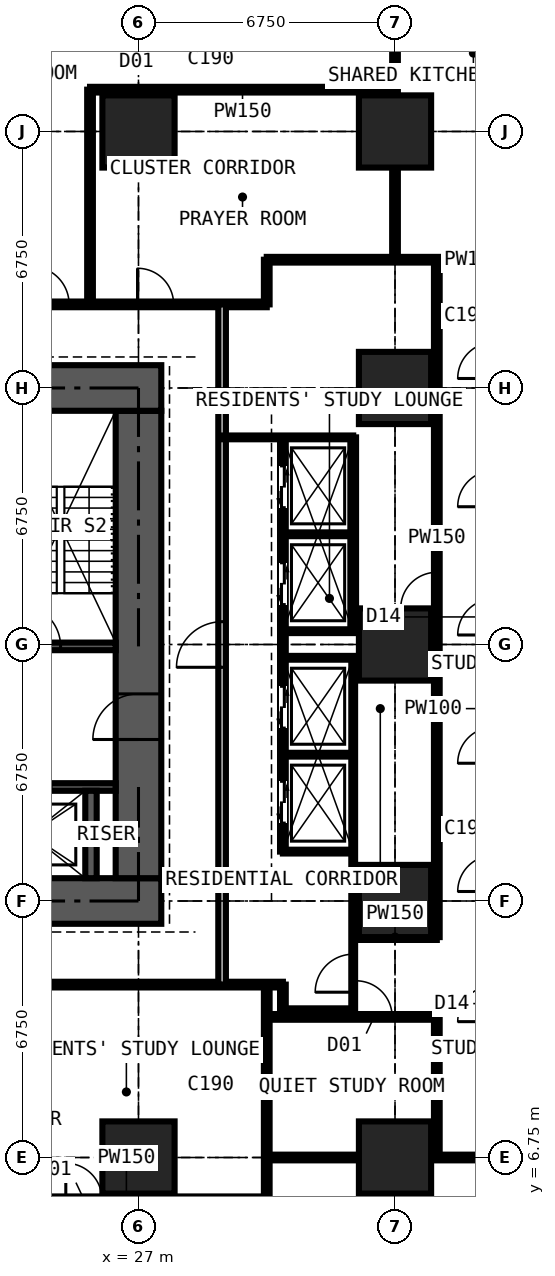
"""IFC4 building model, lengths in metres.
Left out: names, types, materials, properties, quantities, classifications, styles, units other than length and angle.
Written with IfcOpenShell. Run it as: python <this file> out.ifc"""

import sys

from ifc_helpers import new_model, si_unit, direction, frame, frame_2d, origin, origin_2d, place, context, subcontext, project, spatial, rectangle, extrude, element, fill, save


model = new_model("IFC4")
c1 = context("Model", 3, precision=1e-05, world=origin(), true_north=direction((0.0, 1.0)))
c2 = subcontext(c1, "Body", "Model", "MODEL_VIEW")
j1 = project(units=[si_unit("LENGTHUNIT", "METRE"), si_unit("PLANEANGLEUNIT", "RADIAN")], contexts=[c1])
p1 = place(None, origin())
s1 = spatial("IfcSite", under=j1, at=p1, CompositionType="ELEMENT")
p2 = place(p1, origin())
s2 = spatial("IfcBuilding", under=s1, at=p2, CompositionType="ELEMENT")
p3 = place(p2, frame((0.0, 0.0, 25.2)))
s3 = spatial("IfcBuildingStorey", under=s2, at=p3, CompositionType="ELEMENT", Elevation=25.2)
for number, where, z_axis, x_axis in (
    (1, (27.0, 6.75, 0.0), (0.0, 0.0, 1.0), (1.0, 0.0, 0.0)),
    (2, (27.0, 33.75, 0.0), (0.0, 0.0, 1.0), (1.0, 0.0, 0.0)),
    (3, (33.75, 6.75, 0.0), (0.0, 0.0, 1.0), (1.0, 0.0, 0.0)),
    (4, (33.75, 13.5, 0.0), (0.0, 0.0, 1.0), (1.0, 0.0, 0.0)),
    (5, (33.75, 20.25, 0.0), (0.0, 0.0, 1.0), (1.0, 0.0, 0.0)),
    (6, (33.75, 27.0, 0.0), (0.0, 0.0, 1.0), (1.0, 0.0, 0.0)),
    (7, (33.75, 33.75, 0.0), (0.0, 0.0, 1.0), (1.0, 0.0, 0.0)),
):
    element("IfcColumn", number, at=place(p3, frame(where, z_axis=z_axis, x_axis=x_axis)), inside=s3, PredefinedType="COLUMN", context=c2, shape_type="SweptSolid", body=[
        extrude(rectangle(XDim=1.9, YDim=1.9, at=origin_2d()), origin(), (0.0, 0.0, 1.0), 3.6),
    ])
p4 = place(p3, frame((12.9, 13.5, 0.0), z_axis=(0.0, 0.0, 1.0), x_axis=(1.0, 0.0, 0.0)))
e8 = element("IfcWall", 8, at=p4, inside=s3, PredefinedType="SHEAR", context=c2, shape_type="SweptSolid", body=[
    extrude(rectangle(XDim=14.7, YDim=1.2, at=frame_2d((7.35, 0.0))), origin(), (0.0, 0.0, 1.0), 3.6),
])
p5 = place(p3, frame((27.0, 14.1, 0.0), z_axis=(0.0, 0.0, 1.0), x_axis=(0.0, 1.0, 0.0)))
e9 = element("IfcWall", 9, at=p5, inside=s3, PredefinedType="SHEAR", context=c2, shape_type="SweptSolid", body=[
    extrude(rectangle(XDim=12.3, YDim=1.2, at=frame_2d((6.15, 0.0))), origin(), (0.0, 0.0, 1.0), 3.6),
])
p6 = place(p5, frame((3.65, 0.0, 0.0)))
e10 = element("IfcOpeningElement", 10, at=p6, cuts=e9, PredefinedType="OPENING", context=c2, shape_type="SweptSolid", body=[
    extrude(rectangle(XDim=1.2, YDim=2.2, at=frame_2d((0.6, 1.1))), frame((0.0, 0.61, 0.0), z_axis=(0.0, -1.0, 0.0), x_axis=(1.0, 0.0, 0.0)), (0.0, 0.0, 1.0), 1.22),
])
p7 = place(p3, frame((27.6, 27.0, 0.0), z_axis=(0.0, 0.0, 1.0), x_axis=(-1.0, 0.0, 0.0)))
e11 = element("IfcWall", 11, at=p7, inside=s3, PredefinedType="SHEAR", context=c2, shape_type="SweptSolid", body=[
    extrude(rectangle(XDim=14.7, YDim=1.2, at=frame_2d((7.35, 0.0))), origin(), (0.0, 0.0, 1.0), 3.6),
])
p8 = place(p7, frame((5.225, 0.0, 0.0)))
e12 = element("IfcOpeningElement", 12, at=p8, cuts=e11, PredefinedType="OPENING", context=c2, shape_type="SweptSolid", body=[
    extrude(rectangle(XDim=0.9, YDim=2.2, at=frame_2d((0.45, 1.1))), frame((0.0, 0.61, 0.0), z_axis=(0.0, -1.0, 0.0), x_axis=(1.0, 0.0, 0.0)), (0.0, 0.0, 1.0), 1.22),
])
p9 = place(p7, frame((8.2, 0.0, 0.0)))
e13 = element("IfcOpeningElement", 13, at=p9, cuts=e11, PredefinedType="OPENING", context=c2, shape_type="SweptSolid", body=[
    extrude(rectangle(XDim=1.0, YDim=2.2, at=frame_2d((0.5, 1.1))), frame((0.0, 0.61, 0.0), z_axis=(0.0, -1.0, 0.0), x_axis=(1.0, 0.0, 0.0)), (0.0, 0.0, 1.0), 1.22),
])
p10 = place(p3, frame((14.1, 16.5, 0.0), z_axis=(0.0, 0.0, 1.0), x_axis=(1.0, 0.0, 0.0)))
e14 = element("IfcWall", 14, at=p10, inside=s3, PredefinedType="SHEAR", context=c2, shape_type="SweptSolid", body=[
    extrude(rectangle(XDim=12.3, YDim=0.2, at=frame_2d((6.15, 0.0))), origin(), (0.0, 0.0, 1.0), 3.6),
])
p11 = place(p10, frame((0.9, 0.0, 0.0)))
e15 = element("IfcOpeningElement", 15, at=p11, cuts=e14, PredefinedType="OPENING", context=c2, shape_type="SweptSolid", body=[
    extrude(rectangle(XDim=1.1, YDim=2.2, at=frame_2d((0.55, 1.1))), frame((0.0, 0.11, 0.0), z_axis=(0.0, -1.0, 0.0), x_axis=(1.0, 0.0, 0.0)), (0.0, 0.0, 1.0), 0.22),
])
p12 = place(p10, frame((9.5, 0.0, 0.0)))
e16 = element("IfcOpeningElement", 16, at=p12, cuts=e14, PredefinedType="OPENING", context=c2, shape_type="SweptSolid", body=[
    extrude(rectangle(XDim=1.1, YDim=2.2, at=frame_2d((0.55, 1.1))), frame((0.0, 0.11, 0.0), z_axis=(0.0, -1.0, 0.0), x_axis=(1.0, 0.0, 0.0)), (0.0, 0.0, 1.0), 0.22),
])
p13 = place(p3, frame((14.1, 20.2, 0.0), z_axis=(0.0, 0.0, 1.0), x_axis=(1.0, 0.0, 0.0)))
e17 = element("IfcWall", 17, at=p13, inside=s3, PredefinedType="SHEAR", context=c2, shape_type="SweptSolid", body=[
    extrude(rectangle(XDim=12.3, YDim=0.2, at=frame_2d((6.15, 0.0))), origin(), (0.0, 0.0, 1.0), 3.6),
])
p14 = place(p13, frame((0.35, 0.0, 0.0)))
e18 = element("IfcOpeningElement", 18, at=p14, cuts=e17, PredefinedType="OPENING", context=c2, shape_type="SweptSolid", body=[
    extrude(rectangle(XDim=1.1, YDim=2.2, at=frame_2d((0.55, 1.1))), frame((0.0, 0.11, 0.0), z_axis=(0.0, -1.0, 0.0), x_axis=(1.0, 0.0, 0.0)), (0.0, 0.0, 1.0), 0.22),
])
p15 = place(p13, frame((9.75, 0.0, 0.0)))
e19 = element("IfcOpeningElement", 19, at=p15, cuts=e17, PredefinedType="OPENING", context=c2, shape_type="SweptSolid", body=[
    extrude(rectangle(XDim=1.1, YDim=2.2, at=frame_2d((0.55, 1.1))), frame((0.0, 0.11, 0.0), z_axis=(0.0, -1.0, 0.0), x_axis=(1.0, 0.0, 0.0)), (0.0, 0.0, 1.0), 0.22),
])
p16 = place(p3, frame((25.75, 14.1, 0.0), z_axis=(0.0, 0.0, 1.0), x_axis=(0.0, 1.0, 0.0)))
e20 = element("IfcWall", 20, at=p16, inside=s3, PredefinedType="SHEAR", context=c2, shape_type="SweptSolid", body=[
    extrude(rectangle(XDim=2.3, YDim=0.3, at=frame_2d((1.15, 0.0))), origin(), (0.0, 0.0, 1.0), 3.6),
])
p17 = place(p3, frame((10.125, 11.3, 0.0), z_axis=(0.0, 0.0, 1.0), x_axis=(1.0, 0.0, 0.0)))
e21 = element("IfcWall", 21, at=p17, inside=s3, PredefinedType="PARTITIONING", context=c2, shape_type="SweptSolid", body=[
    extrude(rectangle(XDim=20.675, YDim=0.15, at=frame_2d((10.337, 0.0))), origin(), (0.0, 0.0, 1.0), 3.375),
])
p18 = place(p17, frame((1.775, 0.0, 0.0)))
e22 = element("IfcOpeningElement", 22, at=p18, cuts=e21, PredefinedType="OPENING", context=c2, shape_type="SweptSolid", body=[
    extrude(rectangle(XDim=1.0, YDim=2.2, at=frame_2d((0.5, 1.1))), frame((0.0, 0.085, 0.0), z_axis=(0.0, -1.0, 0.0), x_axis=(1.0, 0.0, 0.0)), (0.0, 0.0, 1.0), 0.17),
])
p19 = place(p17, frame((11.312, 0.0, 0.0)))
e23 = element("IfcOpeningElement", 23, at=p19, cuts=e21, PredefinedType="OPENING", context=c2, shape_type="SweptSolid", body=[
    extrude(rectangle(XDim=1.0, YDim=2.2, at=frame_2d((0.5, 1.1))), frame((0.0, 0.085, 0.0), z_axis=(0.0, -1.0, 0.0), x_axis=(1.0, 0.0, 0.0)), (0.0, 0.0, 1.0), 0.17),
])
p20 = place(p3, frame((11.3, 29.2, 0.0), z_axis=(0.0, 0.0, 1.0), x_axis=(1.0, 0.0, 0.0)))
e24 = element("IfcWall", 24, at=p20, inside=s3, PredefinedType="PARTITIONING", context=c2, shape_type="SweptSolid", body=[
    extrude(rectangle(XDim=19.075, YDim=0.15, at=frame_2d((9.538, 0.0))), origin(), (0.0, 0.0, 1.0), 3.375),
])
p21 = place(p20, frame((12.875, 0.0, 0.0)))
e25 = element("IfcOpeningElement", 25, at=p21, cuts=e24, PredefinedType="OPENING", context=c2, shape_type="SweptSolid", body=[
    extrude(rectangle(XDim=1.0, YDim=2.2, at=frame_2d((0.5, 1.1))), frame((0.0, 0.085, 0.0), z_axis=(0.0, -1.0, 0.0), x_axis=(1.0, 0.0, 0.0)), (0.0, 0.0, 1.0), 0.17),
])
p22 = place(p20, frame((10.438, 0.0, 0.0)))
e26 = element("IfcOpeningElement", 26, at=p22, cuts=e24, PredefinedType="OPENING", context=c2, shape_type="SweptSolid", body=[
    extrude(rectangle(XDim=1.0, YDim=2.2, at=frame_2d((0.5, 1.1))), frame((0.0, 0.085, 0.0), z_axis=(0.0, -1.0, 0.0), x_axis=(1.0, 0.0, 0.0)), (0.0, 0.0, 1.0), 0.17),
])
p23 = place(p20, frame((15.675, 0.0, 0.0)))
e27 = element("IfcOpeningElement", 27, at=p23, cuts=e24, PredefinedType="OPENING", context=c2, shape_type="SweptSolid", body=[
    extrude(rectangle(XDim=0.95, YDim=2.2, at=frame_2d((0.475, 1.1))), frame((0.0, 0.085, 0.0), z_axis=(0.0, -1.0, 0.0), x_axis=(1.0, 0.0, 0.0)), (0.0, 0.0, 1.0), 0.17),
])
p24 = place(p3, frame((25.725, 29.2, 0.0), z_axis=(0.0, 0.0, 1.0), x_axis=(0.0, 1.0, 0.0)))
e28 = element("IfcWall", 28, at=p24, inside=s3, PredefinedType="PARTITIONING", context=c2, shape_type="SweptSolid", body=[
    extrude(rectangle(XDim=5.65, YDim=0.15, at=frame_2d((2.825, 0.0))), origin(), (0.0, 0.0, 1.0), 3.375),
])
p25 = place(p3, frame((25.725, 34.85, 0.0), z_axis=(0.0, 0.0, 1.0), x_axis=(1.0, 0.0, 0.0)))
e29 = element("IfcWall", 29, at=p25, inside=s3, PredefinedType="PARTITIONING", context=c2, shape_type="SweptSolid", body=[
    extrude(rectangle(XDim=8.025, YDim=0.15, at=frame_2d((4.012, 0.0))), origin(), (0.0, 0.0, 1.0), 3.375),
])
p26 = place(p3, frame((29.2, 11.3, 0.0), z_axis=(0.0, 0.0, 1.0), x_axis=(0.0, 1.0, 0.0)))
e30 = element("IfcWall", 30, at=p26, inside=s3, PredefinedType="PARTITIONING", context=c2, shape_type="SweptSolid", body=[
    extrude(rectangle(XDim=17.9, YDim=0.2, at=frame_2d((8.95, 0.0))), origin(), (0.0, 0.0, 1.0), 3.375),
])
p27 = place(p26, frame((8.35, 0.0, 0.0)))
e31 = element("IfcOpeningElement", 31, at=p27, cuts=e30, PredefinedType="OPENING", context=c2, shape_type="SweptSolid", body=[
    extrude(rectangle(XDim=1.2, YDim=2.2, at=frame_2d((0.6, 1.1))), frame((0.0, 0.11, 0.0), z_axis=(0.0, -1.0, 0.0), x_axis=(1.0, 0.0, 0.0)), (0.0, 0.0, 1.0), 0.22),
])
p28 = place(p3, frame((29.2, 25.7, 0.0), z_axis=(0.0, 0.0, 1.0), x_axis=(1.0, 0.0, 0.0)))
e32 = element("IfcWall", 32, at=p28, inside=s3, PredefinedType="SHEAR", context=c2, shape_type="SweptSolid", body=[
    extrude(rectangle(XDim=3.45, YDim=0.1, at=frame_2d((1.725, 0.0))), origin(), (0.0, 0.0, 1.0), 3.375),
])
p29 = place(p3, frame((30.375, -0.734, 0.0), z_axis=(0.0, 0.0, 1.0), x_axis=(0.0, 1.0, 0.0)))
e33 = element("IfcWall", 33, at=p29, inside=s3, PredefinedType="PARTITIONING", context=c2, shape_type="SweptSolid", body=[
    extrude(rectangle(XDim=12.034, YDim=0.15, at=frame_2d((6.017, 0.0))), origin(), (0.0, 0.0, 1.0), 3.375),
])
p30 = place(p29, frame((5.134, 0.0, 0.0)))
e34 = element("IfcOpeningElement", 34, at=p30, cuts=e33, PredefinedType="OPENING", context=c2, shape_type="SweptSolid", body=[
    extrude(rectangle(XDim=1.0, YDim=2.2, at=frame_2d((0.5, 1.1))), frame((0.0, 0.085, 0.0), z_axis=(0.0, -1.0, 0.0), x_axis=(1.0, 0.0, 0.0)), (0.0, 0.0, 1.0), 0.17),
])
p31 = place(p3, frame((30.375, 6.75, 0.0), z_axis=(0.0, 0.0, 1.0), x_axis=(1.0, 0.0, 0.0)))
e35 = element("IfcWall", 35, at=p31, inside=s3, PredefinedType="PARTITIONING", context=c2, shape_type="SweptSolid", body=[
    extrude(rectangle(XDim=5.975, YDim=0.15, at=frame_2d((2.988, 0.0))), origin(), (0.0, 0.0, 1.0), 2.877),
])
p32 = place(p3, frame((30.375, 10.45, 0.0), z_axis=(0.0, 0.0, 1.0), x_axis=(1.0, 0.0, 0.0)))
e36 = element("IfcWall", 36, at=p32, inside=s3, PredefinedType="PARTITIONING", context=c2, shape_type="SweptSolid", body=[
    extrude(rectangle(XDim=4.475, YDim=0.15, at=frame_2d((2.238, 0.0))), origin(), (0.0, 0.0, 1.0), 3.375),
])
p33 = place(p32, frame((2.35, 0.0, 0.0)))
e37 = element("IfcOpeningElement", 37, at=p33, cuts=e36, PredefinedType="OPENING", context=c2, shape_type="SweptSolid", body=[
    extrude(rectangle(XDim=0.95, YDim=2.2, at=frame_2d((0.475, 1.1))), frame((0.0, 0.085, 0.0), z_axis=(0.0, -1.0, 0.0), x_axis=(1.0, 0.0, 0.0)), (0.0, 0.0, 1.0), 0.17),
])
p34 = place(p3, frame((30.375, 29.2, 0.0), z_axis=(0.0, 0.0, 1.0), x_axis=(0.0, 1.0, 0.0)))
e38 = element("IfcWall", 38, at=p34, inside=s3, PredefinedType="PARTITIONING", context=c2, shape_type="SweptSolid", body=[
    extrude(rectangle(XDim=1.175, YDim=0.15, at=frame_2d((0.587, 0.0))), origin(), (0.0, 0.0, 1.0), 3.375),
])
p35 = place(p3, frame((30.375, 30.375, 0.0), z_axis=(0.0, 0.0, 1.0), x_axis=(1.0, 0.0, 0.0)))
e39 = element("IfcWall", 39, at=p35, inside=s3, PredefinedType="PARTITIONING", context=c2, shape_type="SweptSolid", body=[
    extrude(rectangle(XDim=10.859, YDim=0.15, at=frame_2d((5.429, 0.0))), origin(), (0.0, 0.0, 1.0), 3.375),
])
p36 = place(p3, frame((30.8, 10.6, 0.0), z_axis=(0.0, 0.0, 1.0), x_axis=(0.0, 1.0, 0.0)))
e40 = element("IfcWall", 40, at=p36, inside=s3, PredefinedType="PARTITIONING", context=c2, shape_type="SweptSolid", body=[
    extrude(rectangle(XDim=0.7, YDim=0.15, at=frame_2d((0.35, 0.0))), origin(), (0.0, 0.0, 1.0), 3.375),
])
p37 = place(p3, frame((30.8, 10.6, 0.0), z_axis=(0.0, 0.0, 1.0), x_axis=(1.0, 0.0, 0.0)))
e41 = element("IfcWall", 41, at=p37, inside=s3, PredefinedType="PARTITIONING", context=c2, shape_type="SweptSolid", body=[
    extrude(rectangle(XDim=1.85, YDim=0.15, at=frame_2d((0.925, 0.0))), origin(), (0.0, 0.0, 1.0), 3.375),
])
p38 = place(p3, frame((30.8, 14.8, 0.0), z_axis=(0.0, 0.0, 1.0), x_axis=(0.0, 1.0, 0.0)))
e42 = element("IfcWall", 42, at=p38, inside=s3, PredefinedType="PARTITIONING", context=c2, shape_type="SweptSolid", body=[
    extrude(rectangle(XDim=10.9, YDim=0.15, at=frame_2d((5.45, 0.0))), origin(), (0.0, 0.0, 1.0), 3.375),
])
p39 = place(p38, frame((0.75, 0.0, 0.0)))
e43 = element("IfcOpeningElement", 43, at=p39, cuts=e42, PredefinedType="OPENING", context=c2, shape_type="SweptSolid", body=[
    extrude(rectangle(XDim=1.1, YDim=2.2, at=frame_2d((0.55, 1.1))), frame((0.0, 0.085, 0.0), z_axis=(0.0, -1.0, 0.0), x_axis=(1.0, 0.0, 0.0)), (0.0, 0.0, 1.0), 0.17),
])
p40 = place(p38, frame((3.25, 0.0, 0.0)))
e44 = element("IfcOpeningElement", 44, at=p40, cuts=e42, PredefinedType="OPENING", context=c2, shape_type="SweptSolid", body=[
    extrude(rectangle(XDim=1.1, YDim=2.2, at=frame_2d((0.55, 1.1))), frame((0.0, 0.085, 0.0), z_axis=(0.0, -1.0, 0.0), x_axis=(1.0, 0.0, 0.0)), (0.0, 0.0, 1.0), 0.17),
])
p41 = place(p38, frame((6.5, 0.0, 0.0)))
e45 = element("IfcOpeningElement", 45, at=p41, cuts=e42, PredefinedType="OPENING", context=c2, shape_type="SweptSolid", body=[
    extrude(rectangle(XDim=1.1, YDim=2.2, at=frame_2d((0.55, 1.1))), frame((0.0, 0.085, 0.0), z_axis=(0.0, -1.0, 0.0), x_axis=(1.0, 0.0, 0.0)), (0.0, 0.0, 1.0), 0.17),
])
p42 = place(p38, frame((9.05, 0.0, 0.0)))
e46 = element("IfcOpeningElement", 46, at=p42, cuts=e42, PredefinedType="OPENING", context=c2, shape_type="SweptSolid", body=[
    extrude(rectangle(XDim=1.1, YDim=2.2, at=frame_2d((0.55, 1.1))), frame((0.0, 0.085, 0.0), z_axis=(0.0, -1.0, 0.0), x_axis=(1.0, 0.0, 0.0)), (0.0, 0.0, 1.0), 0.17),
])
for number, where, z_axis, x_axis in (
    (47, (30.8, 14.8, 0.0), (0.0, 0.0, 1.0), (1.0, 0.0, 0.0)),
    (48, (30.8, 17.35, 0.0), (0.0, 0.0, 1.0), (1.0, 0.0, 0.0)),
    (49, (30.8, 19.9, 0.0), (0.0, 0.0, 1.0), (1.0, 0.0, 0.0)),
    (50, (30.8, 20.6, 0.0), (0.0, 0.0, 1.0), (1.0, 0.0, 0.0)),
    (51, (30.8, 23.15, 0.0), (0.0, 0.0, 1.0), (1.0, 0.0, 0.0)),
):
    element("IfcWall", number, at=place(p3, frame(where, z_axis=z_axis, x_axis=x_axis)), inside=s3, PredefinedType="SHEAR", context=c2, shape_type="SweptSolid", body=[
        extrude(rectangle(XDim=1.85, YDim=0.1, at=frame_2d((0.925, 0.0))), origin(), (0.0, 0.0, 1.0), 3.375),
    ])
p43 = place(p3, frame((32.65, 10.6, 0.0), z_axis=(0.0, 0.0, 1.0), x_axis=(0.0, 1.0, 0.0)))
e52 = element("IfcWall", 52, at=p43, inside=s3, PredefinedType="SHEAR", context=c2, shape_type="SweptSolid", body=[
    extrude(rectangle(XDim=9.3, YDim=0.1, at=frame_2d((4.65, 0.0))), origin(), (0.0, 0.0, 1.0), 3.375),
])
p44 = place(p43, frame((0.5, 0.0, 0.0)))
e53 = element("IfcOpeningElement", 53, at=p44, cuts=e52, PredefinedType="OPENING", context=c2, shape_type="SweptSolid", body=[
    extrude(rectangle(XDim=1.0, YDim=2.2, at=frame_2d((0.5, 1.1))), frame((0.0, 0.06, 0.0), z_axis=(0.0, -1.0, 0.0), x_axis=(1.0, 0.0, 0.0)), (0.0, 0.0, 1.0), 0.12),
])
p45 = place(p3, frame((32.65, 12.55, 0.0), z_axis=(0.0, 0.0, 1.0), x_axis=(1.0, 0.0, 0.0)))
e54 = element("IfcWall", 54, at=p45, inside=s3, PredefinedType="PARTITIONING", context=c2, shape_type="SweptSolid", body=[
    extrude(rectangle(XDim=2.2, YDim=0.15, at=frame_2d((1.1, 0.0))), origin(), (0.0, 0.0, 1.0), 3.375),
])
p46 = place(p3, frame((32.65, 20.6, 0.0), z_axis=(0.0, 0.0, 1.0), x_axis=(0.0, 1.0, 0.0)))
e55 = element("IfcWall", 55, at=p46, inside=s3, PredefinedType="PARTITIONING", context=c2, shape_type="SweptSolid", body=[
    extrude(rectangle(XDim=5.1, YDim=0.15, at=frame_2d((2.55, 0.0))), origin(), (0.0, 0.0, 1.0), 3.375),
])
p47 = place(p3, frame((33.75, 30.375, 0.0), z_axis=(0.0, 0.0, 1.0), x_axis=(0.0, 1.0, 0.0)))
e56 = element("IfcWall", 56, at=p47, inside=s3, PredefinedType="PARTITIONING", context=c2, shape_type="SweptSolid", body=[
    extrude(rectangle(XDim=5.975, YDim=0.15, at=frame_2d((2.988, 0.0))), origin(), (0.0, 0.0, 1.0), 2.877),
])
p48 = place(p3, frame((34.85, 6.75, 0.0), z_axis=(0.0, 0.0, 1.0), x_axis=(0.0, 1.0, 0.0)))
e57 = element("IfcWall", 57, at=p48, inside=s3, PredefinedType="PARTITIONING", context=c2, shape_type="SweptSolid", body=[
    extrude(rectangle(XDim=3.7, YDim=0.15, at=frame_2d((1.85, 0.0))), origin(), (0.0, 0.0, 1.0), 3.375),
])
p49 = place(p3, frame((34.85, 12.55, 0.0), z_axis=(0.0, 0.0, 1.0), x_axis=(0.0, 1.0, 0.0)))
e58 = element("IfcWall", 58, at=p49, inside=s3, PredefinedType="PARTITIONING", context=c2, shape_type="SweptSolid", body=[
    extrude(rectangle(XDim=17.825, YDim=0.15, at=frame_2d((8.913, 0.0))), origin(), (0.0, 0.0, 1.0), 3.375),
])
p50 = place(p49, frame((8.65, 0.0, 0.0)))
e59 = element("IfcOpeningElement", 59, at=p50, cuts=e58, PredefinedType="OPENING", context=c2, shape_type="SweptSolid", body=[
    extrude(rectangle(XDim=0.95, YDim=2.2, at=frame_2d((0.475, 1.1))), frame((0.0, 0.085, 0.0), z_axis=(0.0, -1.0, 0.0), x_axis=(1.0, 0.0, 0.0)), (0.0, 0.0, 1.0), 0.17),
])
p51 = place(p6, origin())
e60 = element("IfcDoor", 60, at=p51, inside=s3, OperationType="DOUBLE_DOOR_SINGLE_SWING", PredefinedType="DOOR", context=c2, shape_type="SweptSolid", body=[
    extrude(rectangle(XDim=1.2, YDim=2.2, at=frame_2d((0.6, 1.1))), frame((0.0, 0.025, 0.0), z_axis=(0.0, -1.0, 0.0), x_axis=(1.0, 0.0, 0.0)), (0.0, 0.0, 1.0), 0.05),
])
fill(e10, e60)
p52 = place(p15, origin())
e61 = element("IfcDoor", 61, at=p52, inside=s3, OperationType="SINGLE_SWING_LEFT", PredefinedType="DOOR", context=c2, shape_type="SweptSolid", body=[
    extrude(rectangle(XDim=1.1, YDim=2.2, at=frame_2d((0.55, 1.1))), frame((0.0, 0.025, 0.0), z_axis=(0.0, -1.0, 0.0), x_axis=(1.0, 0.0, 0.0)), (0.0, 0.0, 1.0), 0.05),
])
fill(e19, e61)
p53 = place(p44, origin())
e62 = element("IfcDoor", 62, at=p53, inside=s3, OperationType="SINGLE_SWING_LEFT", PredefinedType="DOOR", context=c2, shape_type="SweptSolid", body=[
    extrude(rectangle(XDim=1.0, YDim=2.2, at=frame_2d((0.5, 1.1))), frame((0.0, 0.025, 0.0), z_axis=(0.0, -1.0, 0.0), x_axis=(1.0, 0.0, 0.0)), (0.0, 0.0, 1.0), 0.05),
])
fill(e53, e62)
p54 = place(p50, origin())
e63 = element("IfcDoor", 63, at=p54, inside=s3, OperationType="SINGLE_SWING_LEFT", PredefinedType="DOOR", context=c2, shape_type="SweptSolid", body=[
    extrude(rectangle(XDim=0.95, YDim=2.2, at=frame_2d((0.475, 1.1))), frame((0.0, 0.025, 0.0), z_axis=(0.0, -1.0, 0.0), x_axis=(1.0, 0.0, 0.0)), (0.0, 0.0, 1.0), 0.05),
])
fill(e59, e63)
p55 = place(p33, origin())
e64 = element("IfcDoor", 64, at=p55, inside=s3, OperationType="SINGLE_SWING_LEFT", PredefinedType="DOOR", context=c2, shape_type="SweptSolid", body=[
    extrude(rectangle(XDim=0.95, YDim=2.2, at=frame_2d((0.475, 1.1))), frame((0.0, 0.025, 0.0), z_axis=(0.0, -1.0, 0.0), x_axis=(1.0, 0.0, 0.0)), (0.0, 0.0, 1.0), 0.05),
])
fill(e37, e64)
p56 = place(p21, origin())
e65 = element("IfcDoor", 65, at=p56, inside=s3, OperationType="SINGLE_SWING_LEFT", PredefinedType="DOOR", context=c2, shape_type="SweptSolid", body=[
    extrude(rectangle(XDim=1.0, YDim=2.2, at=frame_2d((0.5, 1.1))), frame((0.0, 0.025, 0.0), z_axis=(0.0, -1.0, 0.0), x_axis=(1.0, 0.0, 0.0)), (0.0, 0.0, 1.0), 0.05),
])
fill(e25, e65)
p57 = place(p23, origin())
e66 = element("IfcDoor", 66, at=p57, inside=s3, OperationType="SINGLE_SWING_LEFT", PredefinedType="DOOR", context=c2, shape_type="SweptSolid", body=[
    extrude(rectangle(XDim=0.95, YDim=2.2, at=frame_2d((0.475, 1.1))), frame((0.0, 0.025, 0.0), z_axis=(0.0, -1.0, 0.0), x_axis=(1.0, 0.0, 0.0)), (0.0, 0.0, 1.0), 0.05),
])
fill(e27, e66)
p58 = place(p39, origin())
e67 = element("IfcDoor", 67, at=p58, inside=s3, OperationType="DOUBLE_DOOR_SLIDING", PredefinedType="DOOR", context=c2, shape_type="SweptSolid", body=[
    extrude(rectangle(XDim=1.1, YDim=2.2, at=frame_2d((0.55, 1.1))), frame((0.0, 0.025, 0.0), z_axis=(0.0, -1.0, 0.0), x_axis=(1.0, 0.0, 0.0)), (0.0, 0.0, 1.0), 0.05),
])
fill(e43, e67)
p59 = place(p40, origin())
e68 = element("IfcDoor", 68, at=p59, inside=s3, OperationType="DOUBLE_DOOR_SLIDING", PredefinedType="DOOR", context=c2, shape_type="SweptSolid", body=[
    extrude(rectangle(XDim=1.1, YDim=2.2, at=frame_2d((0.55, 1.1))), frame((0.0, 0.025, 0.0), z_axis=(0.0, -1.0, 0.0), x_axis=(1.0, 0.0, 0.0)), (0.0, 0.0, 1.0), 0.05),
])
fill(e44, e68)
p60 = place(p41, origin())
e69 = element("IfcDoor", 69, at=p60, inside=s3, OperationType="DOUBLE_DOOR_SLIDING", PredefinedType="DOOR", context=c2, shape_type="SweptSolid", body=[
    extrude(rectangle(XDim=1.1, YDim=2.2, at=frame_2d((0.55, 1.1))), frame((0.0, 0.025, 0.0), z_axis=(0.0, -1.0, 0.0), x_axis=(1.0, 0.0, 0.0)), (0.0, 0.0, 1.0), 0.05),
])
fill(e45, e69)
p61 = place(p42, origin())
e70 = element("IfcDoor", 70, at=p61, inside=s3, OperationType="DOUBLE_DOOR_SLIDING", PredefinedType="DOOR", context=c2, shape_type="SweptSolid", body=[
    extrude(rectangle(XDim=1.1, YDim=2.2, at=frame_2d((0.55, 1.1))), frame((0.0, 0.025, 0.0), z_axis=(0.0, -1.0, 0.0), x_axis=(1.0, 0.0, 0.0)), (0.0, 0.0, 1.0), 0.05),
])
fill(e46, e70)
p62 = place(p27, origin())
e71 = element("IfcDoor", 71, at=p62, inside=s3, OperationType="DOUBLE_DOOR_SINGLE_SWING", PredefinedType="DOOR", context=c2, shape_type="SweptSolid", body=[
    extrude(rectangle(XDim=1.2, YDim=2.2, at=frame_2d((0.6, 1.1))), frame((0.0, 0.025, 0.0), z_axis=(0.0, -1.0, 0.0), x_axis=(1.0, 0.0, 0.0)), (0.0, 0.0, 1.0), 0.05),
])
fill(e31, e71)
save(model, sys.argv[1])
